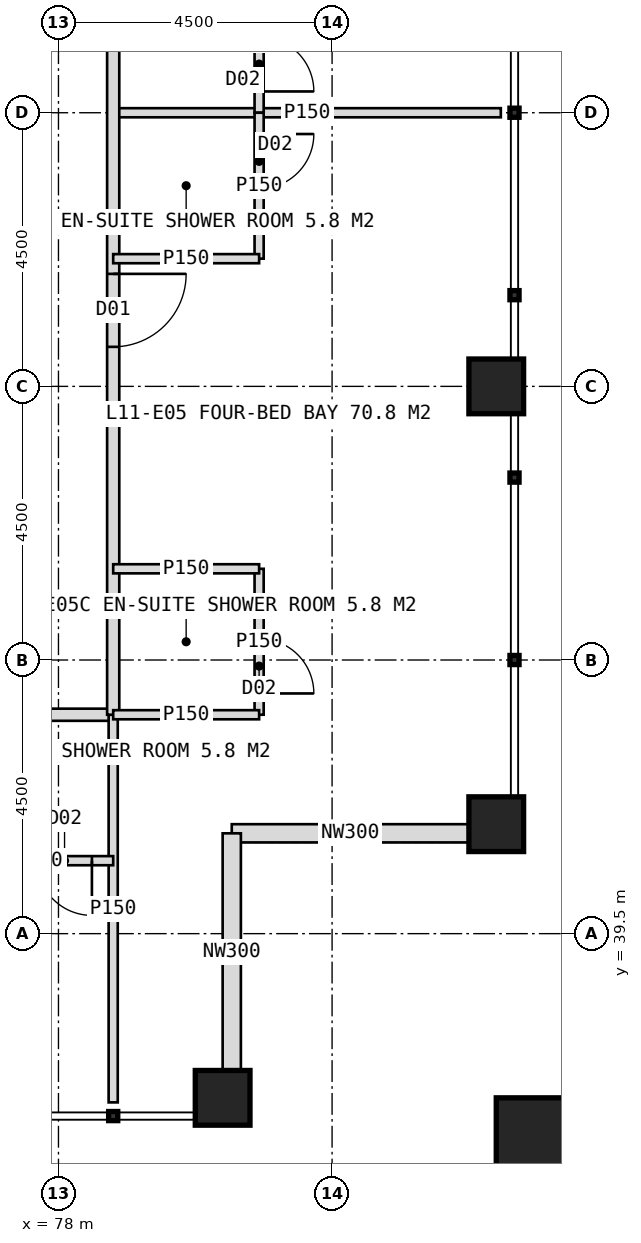
"""IFC4 building model, lengths in metres.
Left out: names, types, materials, properties, quantities, classifications, styles, units other than length and angle.
Written with IfcOpenShell. Run it as: python <this file> out.ifc"""

import sys

from ifc_helpers import new_model, si_unit, direction, frame, frame_2d, origin, origin_2d, place, context, subcontext, project, spatial, rectangle, hollow_rectangle, extrude, element, fill, save


model = new_model("IFC4")
c1 = context("Model", 3, precision=1e-05, world=origin(), true_north=direction((0.0, 1.0)))
c2 = subcontext(c1, "Body", "Model", "MODEL_VIEW")
j1 = project(units=[si_unit("LENGTHUNIT", "METRE"), si_unit("PLANEANGLEUNIT", "RADIAN")], contexts=[c1])
p1 = place(None, origin())
s1 = spatial("IfcSite", under=j1, at=p1, CompositionType="ELEMENT")
p2 = place(p1, origin())
s2 = spatial("IfcBuilding", under=s1, at=p2, CompositionType="ELEMENT")
p3 = place(p2, frame((0.0, 0.0, 51.0)))
s3 = spatial("IfcBuildingStorey", under=s2, at=p3, CompositionType="ELEMENT", Elevation=51.0)
for number, where, z_axis, x_axis in (
    (1, (85.2, 41.3, 0.0), (0.0, 0.0, 1.0), (1.0, 0.0, 0.0)),
    (2, (85.2, 48.5, 0.0), (0.0, 0.0, 1.0), (1.0, 0.0, 0.0)),
    (3, (80.7, 36.8, 0.0), (0.0, 0.0, 1.0), (1.0, 0.0, 0.0)),
):
    element("IfcColumn", number, at=place(p3, frame(where, z_axis=z_axis, x_axis=x_axis)), inside=s3, PredefinedType="COLUMN", context=c2, shape_type="SweptSolid", body=[
        extrude(hollow_rectangle(XDim=0.9, YDim=0.9, WallThickness=0.08, at=origin_2d()), origin(), (0.0, 0.0, 1.0), 4.0),
    ])
p4 = place(p3, frame((86.1, 35.9, 0.0), z_axis=(0.0, 0.0, 1.0), x_axis=(1.0, 0.0, 0.0)))
e4 = element("IfcColumn", 4, at=p4, inside=s3, PredefinedType="COLUMN", context=c2, shape_type="SweptSolid", body=[
    extrude(hollow_rectangle(XDim=1.8, YDim=1.8, WallThickness=0.1, at=origin_2d()), origin(), (0.0, 0.0, 1.0), 4.0),
])
for number, where, z_axis, x_axis in (
    (5, (84.75, 41.15, 0.0), (0.0, 0.0, 1.0), (-1.0, 0.0, 0.0)),
    (6, (80.85, 41.15, 0.0), (0.0, 0.0, 1.0), (0.0, -1.0, 0.0)),
):
    element("IfcWall", number, at=place(p3, frame(where, z_axis=z_axis, x_axis=x_axis)), inside=s3, PredefinedType="ELEMENTEDWALL", context=c2, shape_type="SweptSolid", body=[
        extrude(rectangle(XDim=3.9, YDim=0.3, at=frame_2d((1.95, 0.0))), origin(), (0.0, 0.0, 1.0), 2.95),
    ])
p5 = place(p3, frame((78.9, 43.1, 0.0), z_axis=(0.0, 0.0, 1.0), x_axis=(-1.0, 0.0, 0.0)))
e7 = element("IfcWall", 7, at=p5, inside=s3, PredefinedType="PARTITIONING", context=c2, shape_type="SweptSolid", body=[
    extrude(rectangle(XDim=37.8, YDim=0.2, at=frame_2d((18.9, 0.0))), origin(), (0.0, 0.0, 1.0), 3.75),
])
p6 = place(p5, frame((2.65, 0.0, 0.0)))
e8 = element("IfcOpeningElement", 8, at=p6, cuts=e7, PredefinedType="OPENING", context=c2, shape_type="SweptSolid", body=[
    extrude(rectangle(XDim=1.2, YDim=2.2, at=frame_2d((0.6, 1.1))), frame((0.0, 0.11, 0.0), z_axis=(0.0, -1.0, 0.0), x_axis=(1.0, 0.0, 0.0)), (0.0, 0.0, 1.0), 0.22),
])
p7 = place(p5, frame((12.55, 0.0, 0.0)))
e9 = element("IfcOpeningElement", 9, at=p7, cuts=e7, PredefinedType="OPENING", context=c2, shape_type="SweptSolid", body=[
    extrude(rectangle(XDim=1.2, YDim=2.2, at=frame_2d((0.6, 1.1))), frame((0.0, 0.11, 0.0), z_axis=(0.0, -1.0, 0.0), x_axis=(1.0, 0.0, 0.0)), (0.0, 0.0, 1.0), 0.22),
])
p8 = place(p5, frame((21.55, 0.0, 0.0)))
e10 = element("IfcOpeningElement", 10, at=p8, cuts=e7, PredefinedType="OPENING", context=c2, shape_type="SweptSolid", body=[
    extrude(rectangle(XDim=1.2, YDim=2.2, at=frame_2d((0.6, 1.1))), frame((0.0, 0.11, 0.0), z_axis=(0.0, -1.0, 0.0), x_axis=(1.0, 0.0, 0.0)), (0.0, 0.0, 1.0), 0.22),
])
p9 = place(p5, frame((30.55, 0.0, 0.0)))
e11 = element("IfcOpeningElement", 11, at=p9, cuts=e7, PredefinedType="OPENING", context=c2, shape_type="SweptSolid", body=[
    extrude(rectangle(XDim=1.2, YDim=2.2, at=frame_2d((0.6, 1.1))), frame((0.0, 0.11, 0.0), z_axis=(0.0, -1.0, 0.0), x_axis=(1.0, 0.0, 0.0)), (0.0, 0.0, 1.0), 0.22),
])
p10 = place(p3, frame((78.9, 43.1, 0.0), z_axis=(0.0, 0.0, 1.0), x_axis=(0.0, -1.0, 0.0)))
e12 = element("IfcWall", 12, at=p10, inside=s3, PredefinedType="PARTITIONING", context=c2, shape_type="SweptSolid", body=[
    extrude(rectangle(XDim=6.375, YDim=0.15, at=frame_2d((3.188, 0.0))), origin(), (0.0, 0.0, 1.0), 3.75),
])
p11 = place(p3, frame((78.9, 40.7, 0.0), z_axis=(0.0, 0.0, 1.0), x_axis=(-1.0, 0.0, 0.0)))
e13 = element("IfcWall", 13, at=p11, inside=s3, PredefinedType="PARTITIONING", context=c2, shape_type="SweptSolid", body=[
    extrude(rectangle(XDim=2.4, YDim=0.15, at=frame_2d((1.2, 0.0))), origin(), (0.0, 0.0, 1.0), 3.75),
])
p12 = place(p11, frame((0.35, 0.0, 0.0)))
e14 = element("IfcOpeningElement", 14, at=p12, cuts=e13, PredefinedType="OPENING", context=c2, shape_type="SweptSolid", body=[
    extrude(rectangle(XDim=0.9, YDim=2.1, at=frame_2d((0.45, 1.05))), frame((0.0, 0.085, 0.0), z_axis=(0.0, -1.0, 0.0), x_axis=(1.0, 0.0, 0.0)), (0.0, 0.0, 1.0), 0.17),
])
p13 = place(p3, frame((78.9, 53.0, 0.0), z_axis=(0.0, 0.0, 1.0), x_axis=(1.0, 0.0, 0.0)))
e15 = element("IfcWall", 15, at=p13, inside=s3, PredefinedType="PARTITIONING", context=c2, shape_type="SweptSolid", body=[
    extrude(rectangle(XDim=6.375, YDim=0.15, at=frame_2d((3.188, 0.0))), origin(), (0.0, 0.0, 1.0), 3.75),
])
p14 = place(p3, frame((78.9, 80.9, 0.0), z_axis=(0.0, 0.0, 1.0), x_axis=(0.0, -1.0, 0.0)))
e16 = element("IfcWall", 16, at=p14, inside=s3, PredefinedType="PARTITIONING", context=c2, shape_type="SweptSolid", body=[
    extrude(rectangle(XDim=37.8, YDim=0.2, at=frame_2d((18.9, 0.0))), origin(), (0.0, 0.0, 1.0), 3.75),
])
p15 = place(p14, frame((3.25, 0.0, 0.0)))
e17 = element("IfcOpeningElement", 17, at=p15, cuts=e16, PredefinedType="OPENING", context=c2, shape_type="SweptSolid", body=[
    extrude(rectangle(XDim=1.2, YDim=2.2, at=frame_2d((0.6, 1.1))), frame((0.0, 0.11, 0.0), z_axis=(0.0, -1.0, 0.0), x_axis=(1.0, 0.0, 0.0)), (0.0, 0.0, 1.0), 0.22),
])
p16 = place(p14, frame((9.55, 0.0, 0.0)))
e18 = element("IfcOpeningElement", 18, at=p16, cuts=e16, PredefinedType="OPENING", context=c2, shape_type="SweptSolid", body=[
    extrude(rectangle(XDim=1.2, YDim=2.2, at=frame_2d((0.6, 1.1))), frame((0.0, 0.11, 0.0), z_axis=(0.0, -1.0, 0.0), x_axis=(1.0, 0.0, 0.0)), (0.0, 0.0, 1.0), 0.22),
])
p17 = place(p14, frame((15.55, 0.0, 0.0)))
e19 = element("IfcOpeningElement", 19, at=p17, cuts=e16, PredefinedType="OPENING", context=c2, shape_type="SweptSolid", body=[
    extrude(rectangle(XDim=1.2, YDim=2.2, at=frame_2d((0.6, 1.1))), frame((0.0, 0.11, 0.0), z_axis=(0.0, -1.0, 0.0), x_axis=(1.0, 0.0, 0.0)), (0.0, 0.0, 1.0), 0.22),
])
p18 = place(p14, frame((21.55, 0.0, 0.0)))
e20 = element("IfcOpeningElement", 20, at=p18, cuts=e16, PredefinedType="OPENING", context=c2, shape_type="SweptSolid", body=[
    extrude(rectangle(XDim=1.2, YDim=2.2, at=frame_2d((0.6, 1.1))), frame((0.0, 0.11, 0.0), z_axis=(0.0, -1.0, 0.0), x_axis=(1.0, 0.0, 0.0)), (0.0, 0.0, 1.0), 0.22),
])
p19 = place(p14, frame((30.55, 0.0, 0.0)))
e21 = element("IfcOpeningElement", 21, at=p19, cuts=e16, PredefinedType="OPENING", context=c2, shape_type="SweptSolid", body=[
    extrude(rectangle(XDim=1.2, YDim=2.2, at=frame_2d((0.6, 1.1))), frame((0.0, 0.11, 0.0), z_axis=(0.0, -1.0, 0.0), x_axis=(1.0, 0.0, 0.0)), (0.0, 0.0, 1.0), 0.22),
])
p20 = place(p3, frame((81.3, 55.4, 0.0), z_axis=(0.0, 0.0, 1.0), x_axis=(0.0, -1.0, 0.0)))
e22 = element("IfcWall", 22, at=p20, inside=s3, PredefinedType="PARTITIONING", context=c2, shape_type="SweptSolid", body=[
    extrude(rectangle(XDim=2.4, YDim=0.15, at=frame_2d((1.2, 0.0))), origin(), (0.0, 0.0, 1.0), 3.75),
])
p21 = place(p20, frame((1.15, 0.0, 0.0)))
e23 = element("IfcOpeningElement", 23, at=p21, cuts=e22, PredefinedType="OPENING", context=c2, shape_type="SweptSolid", body=[
    extrude(rectangle(XDim=0.9, YDim=2.1, at=frame_2d((0.45, 1.05))), frame((0.0, 0.085, 0.0), z_axis=(0.0, -1.0, 0.0), x_axis=(1.0, 0.0, 0.0)), (0.0, 0.0, 1.0), 0.17),
])
p22 = place(p3, frame((81.3, 53.0, 0.0), z_axis=(0.0, 0.0, 1.0), x_axis=(0.0, -1.0, 0.0)))
e24 = element("IfcWall", 24, at=p22, inside=s3, PredefinedType="PARTITIONING", context=c2, shape_type="SweptSolid", body=[
    extrude(rectangle(XDim=2.4, YDim=0.15, at=frame_2d((1.2, 0.0))), origin(), (0.0, 0.0, 1.0), 3.75),
])
p23 = place(p22, frame((0.35, 0.0, 0.0)))
e25 = element("IfcOpeningElement", 25, at=p23, cuts=e24, PredefinedType="OPENING", context=c2, shape_type="SweptSolid", body=[
    extrude(rectangle(XDim=0.9, YDim=2.1, at=frame_2d((0.45, 1.05))), frame((0.0, 0.085, 0.0), z_axis=(0.0, -1.0, 0.0), x_axis=(1.0, 0.0, 0.0)), (0.0, 0.0, 1.0), 0.17),
])
p24 = place(p3, frame((78.9, 50.6, 0.0), z_axis=(0.0, 0.0, 1.0), x_axis=(1.0, 0.0, 0.0)))
e26 = element("IfcWall", 26, at=p24, inside=s3, PredefinedType="PARTITIONING", context=c2, shape_type="SweptSolid", body=[
    extrude(rectangle(XDim=2.4, YDim=0.15, at=frame_2d((1.2, 0.0))), origin(), (0.0, 0.0, 1.0), 3.75),
])
p25 = place(p3, frame((81.3, 45.5, 0.0), z_axis=(0.0, 0.0, 1.0), x_axis=(0.0, -1.0, 0.0)))
e27 = element("IfcWall", 27, at=p25, inside=s3, PredefinedType="PARTITIONING", context=c2, shape_type="SweptSolid", body=[
    extrude(rectangle(XDim=2.4, YDim=0.15, at=frame_2d((1.2, 0.0))), origin(), (0.0, 0.0, 1.0), 3.75),
])
p26 = place(p25, frame((1.15, 0.0, 0.0)))
e28 = element("IfcOpeningElement", 28, at=p26, cuts=e27, PredefinedType="OPENING", context=c2, shape_type="SweptSolid", body=[
    extrude(rectangle(XDim=0.9, YDim=2.1, at=frame_2d((0.45, 1.05))), frame((0.0, 0.085, 0.0), z_axis=(0.0, -1.0, 0.0), x_axis=(1.0, 0.0, 0.0)), (0.0, 0.0, 1.0), 0.17),
])
for number, where, z_axis, x_axis in (
    (29, (78.9, 45.5, 0.0), (0.0, 0.0, 1.0), (1.0, 0.0, 0.0)),
    (30, (78.9, 43.1, 0.0), (0.0, 0.0, 1.0), (1.0, 0.0, 0.0)),
):
    element("IfcWall", number, at=place(p3, frame(where, z_axis=z_axis, x_axis=x_axis)), inside=s3, PredefinedType="PARTITIONING", context=c2, shape_type="SweptSolid", body=[
        extrude(rectangle(XDim=2.4, YDim=0.15, at=frame_2d((1.2, 0.0))), origin(), (0.0, 0.0, 1.0), 3.75),
    ])
p27 = place(p12, origin())
e31 = element("IfcDoor", 31, at=p27, inside=s3, OperationType="SINGLE_SWING_LEFT", PredefinedType="DOOR", context=c2, shape_type="SweptSolid", body=[
    extrude(rectangle(XDim=0.9, YDim=2.1, at=frame_2d((0.45, 1.05))), frame((0.0, 0.025, 0.0), z_axis=(0.0, -1.0, 0.0), x_axis=(1.0, 0.0, 0.0)), (0.0, 0.0, 1.0), 0.05),
])
fill(e14, e31)
p28 = place(p21, origin())
e32 = element("IfcDoor", 32, at=p28, inside=s3, OperationType="SINGLE_SWING_RIGHT", PredefinedType="DOOR", context=c2, shape_type="SweptSolid", body=[
    extrude(rectangle(XDim=0.9, YDim=2.1, at=frame_2d((0.45, 1.05))), frame((0.0, 0.025, 0.0), z_axis=(0.0, -1.0, 0.0), x_axis=(1.0, 0.0, 0.0)), (0.0, 0.0, 1.0), 0.05),
])
fill(e23, e32)
p29 = place(p19, origin())
e33 = element("IfcDoor", 33, at=p29, inside=s3, OperationType="SINGLE_SWING_LEFT", PredefinedType="DOOR", context=c2, shape_type="SweptSolid", body=[
    extrude(rectangle(XDim=1.2, YDim=2.2, at=frame_2d((0.6, 1.1))), frame((0.0, 0.025, 0.0), z_axis=(0.0, -1.0, 0.0), x_axis=(1.0, 0.0, 0.0)), (0.0, 0.0, 1.0), 0.05),
])
fill(e21, e33)
p30 = place(p23, origin())
e34 = element("IfcDoor", 34, at=p30, inside=s3, OperationType="SINGLE_SWING_LEFT", PredefinedType="DOOR", context=c2, shape_type="SweptSolid", body=[
    extrude(rectangle(XDim=0.9, YDim=2.1, at=frame_2d((0.45, 1.05))), frame((0.0, 0.025, 0.0), z_axis=(0.0, -1.0, 0.0), x_axis=(1.0, 0.0, 0.0)), (0.0, 0.0, 1.0), 0.05),
])
fill(e25, e34)
p31 = place(p26, origin())
e35 = element("IfcDoor", 35, at=p31, inside=s3, OperationType="SINGLE_SWING_RIGHT", PredefinedType="DOOR", context=c2, shape_type="SweptSolid", body=[
    extrude(rectangle(XDim=0.9, YDim=2.1, at=frame_2d((0.45, 1.05))), frame((0.0, 0.025, 0.0), z_axis=(0.0, -1.0, 0.0), x_axis=(1.0, 0.0, 0.0)), (0.0, 0.0, 1.0), 0.05),
])
fill(e28, e35)
save(model, sys.argv[1])
